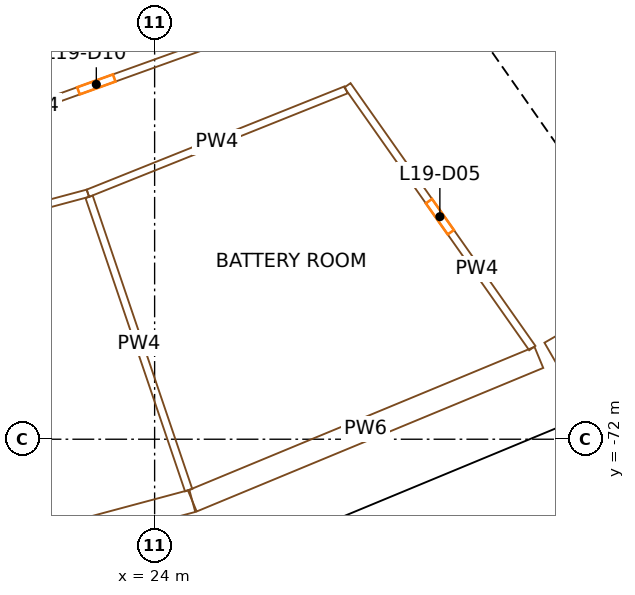
"""IFC4 building model, lengths in metres.
Left out: names, types, materials, properties, quantities, classifications, styles, units other than length and angle.
Written with IfcOpenShell. Run it as: python <this file> out.ifc"""

import sys

from ifc_helpers import new_model, si_unit, direction, frame, frame_2d, origin, origin_2d, place, context, subcontext, project, spatial, rectangle, extrude, element, fill, save


model = new_model("IFC4")
c1 = context("Model", 3, precision=1e-05, world=origin(), true_north=direction((0.0, 1.0)))
c2 = subcontext(c1, "Body", "Model", "MODEL_VIEW")
j1 = project(units=[si_unit("LENGTHUNIT", "METRE"), si_unit("PLANEANGLEUNIT", "RADIAN")], contexts=[c1])
p1 = place(None, origin())
s1 = spatial("IfcSite", under=j1, at=p1, CompositionType="ELEMENT")
p2 = place(p1, origin())
s2 = spatial("IfcBuilding", under=s1, at=p2, CompositionType="ELEMENT")
p3 = place(p2, frame((0.0, 0.0, 89.9)))
s3 = spatial("IfcBuildingStorey", under=s2, at=p3, CompositionType="ELEMENT", Elevation=89.9)
for number, where, z_axis, x_axis in (
    (1, (24.992, -73.624, 0.0), (0.0, 0.0, 1.0), (0.947, 0.321, 0.0)),
    (2, (34.388, -69.732, 0.0), (0.0, 0.0, 1.0), (0.897, 0.442, 0.0)),
):
    element("IfcColumn", number, at=place(p3, frame(where, z_axis=z_axis, x_axis=x_axis)), inside=s3, PredefinedType="COLUMN", context=c2, shape_type="SweptSolid", body=[
        extrude(rectangle(XDim=1.3, YDim=1.7, at=origin_2d()), origin(), (0.0, 0.0, 1.0), 5.0),
    ])
p4 = place(p3, frame((36.717, -66.337, 0.0), z_axis=(0.0, 0.0, 1.0), x_axis=(-0.573577477574, 0.819151315216, 0.0)))
e3 = element("IfcWall", 3, at=p4, inside=s3, PredefinedType="SHEAR", context=c2, shape_type="SweptSolid", body=[
    extrude(rectangle(XDim=14.8, YDim=0.9, at=frame_2d((7.4, 0.0))), origin(), (0.0, 0.0, 1.0), 4.7),
])
p5 = place(p4, frame((6.2, 0.0, 0.0)))
e4 = element("IfcOpeningElement", 4, at=p5, cuts=e3, PredefinedType="OPENING", context=c2, shape_type="SweptSolid", body=[
    extrude(rectangle(XDim=2.4, YDim=2.1, at=frame_2d((1.2, 1.05))), frame((0.0, 0.46, 0.0), z_axis=(0.0, -1.0, 0.0), x_axis=(1.0, 0.0, 0.0)), (0.0, 0.0, 1.0), 0.92),
])
p6 = place(p3, frame((25.585, -75.214, 0.0), z_axis=(0.0, 0.0, 1.0), x_axis=(0.923877173549, 0.382689127353, 0.0)))
e5 = element("IfcWall", 5, at=p6, inside=s3, PredefinedType="SOLIDWALL", context=c2, shape_type="SweptSolid", body=[
    extrude(rectangle(XDim=10.291, YDim=0.4, at=frame_2d((5.146, 0.0))), origin(), (0.0, 0.0, 1.0), 3.6),
])
p7 = place(p3, frame((22.244, -65.528, 0.0), z_axis=(0.0, 0.0, 1.0), x_axis=(-0.965926260719, -0.258817423781, 0.0)))
e6 = element("IfcWall", 6, at=p7, inside=s3, PredefinedType="PARTITIONING", context=c2, shape_type="SweptSolid", body=[
    extrude(rectangle(XDim=9.052, YDim=0.2, at=frame_2d((4.526, 0.0))), origin(), (0.0, 0.0, 1.0), 3.6),
])
p8 = place(p7, frame((4.026, 0.0, 0.0)))
e7 = element("IfcOpeningElement", 7, at=p8, cuts=e6, PredefinedType="OPENING", context=c2, shape_type="SweptSolid", body=[
    extrude(rectangle(XDim=1.0, YDim=2.1, at=frame_2d((0.5, 1.05))), frame((0.0, 0.11, 0.0), z_axis=(0.0, -1.0, 0.0), x_axis=(1.0, 0.0, 0.0)), (0.0, 0.0, 1.0), 0.22),
])
p9 = place(p3, frame((15.168, -76.256, 0.0), z_axis=(0.0, 0.0, 1.0), x_axis=(0.965924263558, 0.258824877223, 0.0)))
e8 = element("IfcWall", 8, at=p9, inside=s3, PredefinedType="PARTITIONING", context=c2, shape_type="SweptSolid", body=[
    extrude(rectangle(XDim=10.17, YDim=0.6, at=frame_2d((5.085, 0.0))), origin(), (0.0, 0.0, 1.0), 3.6),
])
p10 = place(p3, frame((17.299, -64.52, 0.0), z_axis=(0.0, 0.0, 1.0), x_axis=(0.941107439859, 0.338107655404, 0.0)))
e9 = element("IfcWall", 9, at=p10, inside=s3, PredefinedType="PARTITIONING", context=c2, shape_type="SweptSolid", body=[
    extrude(rectangle(XDim=10.981, YDim=0.2, at=frame_2d((5.49, 0.0))), origin(), (0.0, 0.0, 1.0), 3.6),
])
p11 = place(p10, frame((4.99, 0.0, 0.0)))
e10 = element("IfcOpeningElement", 10, at=p11, cuts=e9, PredefinedType="OPENING", context=c2, shape_type="SweptSolid", body=[
    extrude(rectangle(XDim=1.0, YDim=2.1, at=frame_2d((0.5, 1.05))), frame((0.0, 0.11, 0.0), z_axis=(0.0, -1.0, 0.0), x_axis=(1.0, 0.0, 0.0)), (0.0, 0.0, 1.0), 0.22),
])
p12 = place(p3, frame((22.244, -65.528, 0.0), z_axis=(0.0, 0.0, 1.0), x_axis=(0.928338595819, 0.371735728056, 0.0)))
e11 = element("IfcWall", 11, at=p12, inside=s3, PredefinedType="PARTITIONING", context=c2, shape_type="SweptSolid", body=[
    extrude(rectangle(XDim=7.319, YDim=0.2, at=frame_2d((3.659, 0.0))), origin(), (0.0, 0.0, 1.0), 3.6),
])
p13 = place(p3, frame((24.896, -73.34, 0.0), z_axis=(0.0, 0.0, 1.0), x_axis=(-0.321453202328, 0.946925466292, 0.0)))
e12 = element("IfcWall", 12, at=p13, inside=s3, PredefinedType="PARTITIONING", context=c2, shape_type="SweptSolid", body=[
    extrude(rectangle(XDim=8.15, YDim=0.2, at=frame_2d((4.075, 0.0))), origin(), (0.0, 0.0, 1.0), 3.6),
])
p14 = place(p3, frame((24.992, -73.624, 0.0), z_axis=(0.0, 0.0, 1.0), x_axis=(0.923883575944, 0.382673670509, 0.0)))
e13 = element("IfcWall", 13, at=p14, inside=s3, PredefinedType="PARTITIONING", context=c2, shape_type="SweptSolid", body=[
    extrude(rectangle(XDim=9.87, YDim=0.6, at=frame_2d((4.935, 0.0))), origin(), (0.0, 0.0, 1.0), 3.6),
])
p15 = place(p3, frame((33.938, -69.602, 0.0), z_axis=(0.0, 0.0, 1.0), x_axis=(-0.575412564813, 0.817863301693, 0.0)))
e14 = element("IfcWall", 14, at=p15, inside=s3, PredefinedType="PARTITIONING", context=c2, shape_type="SweptSolid", body=[
    extrude(rectangle(XDim=8.454, YDim=0.2, at=frame_2d((4.227, 0.0))), origin(), (0.0, 0.0, 1.0), 3.6),
])
p16 = place(p15, frame((3.727, 0.0, 0.0)))
e15 = element("IfcOpeningElement", 15, at=p16, cuts=e14, PredefinedType="OPENING", context=c2, shape_type="SweptSolid", body=[
    extrude(rectangle(XDim=1.0, YDim=2.1, at=frame_2d((0.5, 1.05))), frame((0.0, 0.11, 0.0), z_axis=(0.0, -1.0, 0.0), x_axis=(1.0, 0.0, 0.0)), (0.0, 0.0, 1.0), 0.22),
])
p17 = place(p3, frame((34.407, -69.72, 0.0), z_axis=(0.0, 0.0, 1.0), x_axis=(0.866037016931, 0.4999798849, 0.0)))
e16 = element("IfcWall", 16, at=p17, inside=s3, PredefinedType="PARTITIONING", context=c2, shape_type="SweptSolid", body=[
    extrude(rectangle(XDim=10.125, YDim=0.6, at=frame_2d((5.062, 0.0))), origin(), (0.0, 0.0, 1.0), 3.6),
])
p18 = place(p16, origin())
e17 = element("IfcDoor", 17, at=p18, inside=s3, OperationType="SINGLE_SWING_RIGHT", PredefinedType="DOOR", context=c2, shape_type="SweptSolid", body=[
    extrude(rectangle(XDim=1.0, YDim=2.1, at=frame_2d((0.5, 1.05))), frame((0.0, 0.025, 0.0), z_axis=(0.0, -1.0, 0.0), x_axis=(1.0, 0.0, 0.0)), (0.0, 0.0, 1.0), 0.05),
])
fill(e15, e17)
p19 = place(p11, origin())
e18 = element("IfcDoor", 18, at=p19, inside=s3, OperationType="SINGLE_SWING_RIGHT", PredefinedType="DOOR", context=c2, shape_type="SweptSolid", body=[
    extrude(rectangle(XDim=1.0, YDim=2.1, at=frame_2d((0.5, 1.05))), frame((0.0, 0.025, 0.0), z_axis=(0.0, -1.0, 0.0), x_axis=(1.0, 0.0, 0.0)), (0.0, 0.0, 1.0), 0.05),
])
fill(e10, e18)
save(model, sys.argv[1])
